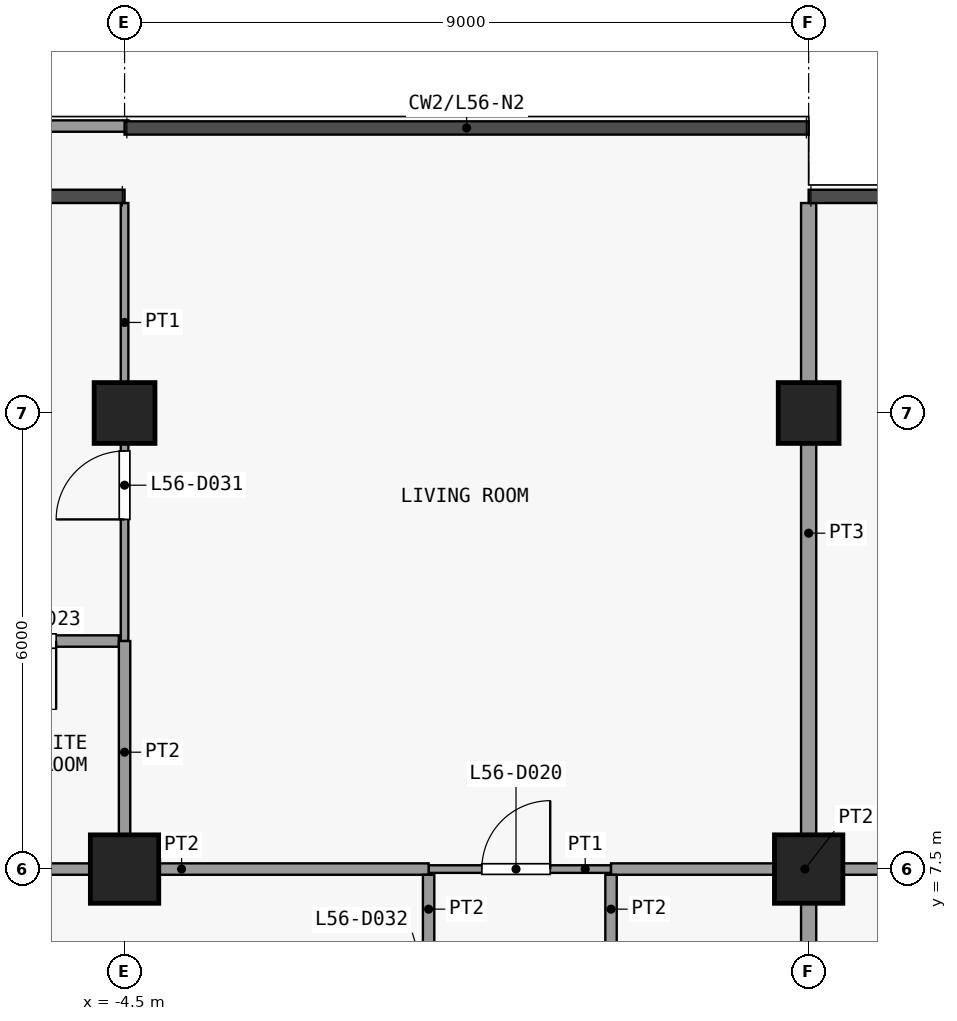
"""IFC4 building model, lengths in metres.
Left out: names, types, materials, properties, quantities, classifications, styles, units other than length and angle.
Written with IfcOpenShell. Run it as: python <this file> out.ifc"""

import sys

from ifc_helpers import new_model, si_unit, direction, frame, frame_2d, origin, origin_2d, place, context, subcontext, project, spatial, rectangle, extrude, element, fill, save


model = new_model("IFC4")
c1 = context("Model", 3, precision=1e-05, world=origin(), true_north=direction((0.0, 1.0)))
c2 = subcontext(c1, "Body", "Model", "MODEL_VIEW")
j1 = project(units=[si_unit("LENGTHUNIT", "METRE"), si_unit("PLANEANGLEUNIT", "RADIAN")], contexts=[c1])
p1 = place(None, origin())
s1 = spatial("IfcSite", under=j1, at=p1, CompositionType="ELEMENT")
p2 = place(p1, origin())
s2 = spatial("IfcBuilding", under=s1, at=p2, CompositionType="ELEMENT")
p3 = place(p2, frame((0.0, 0.0, 223.1)))
s3 = spatial("IfcBuildingStorey", under=s2, at=p3, CompositionType="ELEMENT", Elevation=223.1)
p4 = place(p3, frame((-4.5, 7.5, 0.0), z_axis=(0.0, 0.0, 1.0), x_axis=(1.0, 0.0, 0.0)))
e1 = element("IfcColumn", 1, at=p4, inside=s3, PredefinedType="COLUMN", context=c2, shape_type="SweptSolid", body=[
    extrude(rectangle(XDim=0.9, YDim=0.9, at=origin_2d()), origin(), (0.0, 0.0, 1.0), 3.6),
])
p5 = place(p3, frame((-4.5, 13.5, 0.0), z_axis=(0.0, 0.0, 1.0), x_axis=(1.0, 0.0, 0.0)))
e2 = element("IfcColumn", 2, at=p5, inside=s3, PredefinedType="COLUMN", context=c2, shape_type="SweptSolid", body=[
    extrude(rectangle(XDim=0.8, YDim=0.8, at=origin_2d()), origin(), (0.0, 0.0, 1.0), 3.6),
])
p6 = place(p3, frame((4.5, 7.5, 0.0), z_axis=(0.0, 0.0, 1.0), x_axis=(1.0, 0.0, 0.0)))
e3 = element("IfcColumn", 3, at=p6, inside=s3, PredefinedType="COLUMN", context=c2, shape_type="SweptSolid", body=[
    extrude(rectangle(XDim=0.9, YDim=0.9, at=origin_2d()), origin(), (0.0, 0.0, 1.0), 3.6),
])
p7 = place(p3, frame((4.5, 13.5, 0.0), z_axis=(0.0, 0.0, 1.0), x_axis=(1.0, 0.0, 0.0)))
e4 = element("IfcColumn", 4, at=p7, inside=s3, PredefinedType="COLUMN", context=c2, shape_type="SweptSolid", body=[
    extrude(rectangle(XDim=0.8, YDim=0.8, at=origin_2d()), origin(), (0.0, 0.0, 1.0), 3.6),
])
p8 = place(p3, frame((-10.3, 17.275, 0.0), z_axis=(0.0, 0.0, 1.0), x_axis=(1.0, 0.0, 0.0)))
e5 = element("IfcWall", 5, at=p8, inside=s3, PredefinedType="PARAPET", context=c2, shape_type="SweptSolid", body=[
    extrude(rectangle(XDim=5.853, YDim=0.15, at=frame_2d((2.926, 0.0))), origin(), (0.0, 0.0, 1.0), 1.15),
])
p9 = place(p3, frame((-0.5, 7.5, 0.0), z_axis=(0.0, 0.0, 1.0), x_axis=(1.0, 0.0, 0.0)))
e6 = element("IfcWall", 6, at=p9, inside=s3, PredefinedType="PARTITIONING", context=c2, shape_type="SweptSolid", body=[
    extrude(rectangle(XDim=2.4, YDim=0.1, at=frame_2d((1.2, 0.0))), origin(), (0.0, 0.0, 1.0), 3.3),
])
p10 = place(p9, frame((0.7, 0.0, 0.0)))
e7 = element("IfcOpeningElement", 7, at=p10, cuts=e6, PredefinedType="OPENING", context=c2, shape_type="SweptSolid", body=[
    extrude(rectangle(XDim=0.9, YDim=2.1, at=frame_2d((0.45, 1.05))), frame((0.0, 0.06, 0.0), z_axis=(0.0, -1.0, 0.0), x_axis=(1.0, 0.0, 0.0)), (0.0, 0.0, 1.0), 0.12),
])
p11 = place(p3, frame((-7.0, 7.5, 0.0), z_axis=(0.0, 0.0, 1.0), x_axis=(1.0, 0.0, 0.0)))
e8 = element("IfcWall", 8, at=p11, inside=s3, PredefinedType="PARTITIONING", context=c2, shape_type="SweptSolid", body=[
    extrude(rectangle(XDim=6.5, YDim=0.15, at=frame_2d((3.25, 0.0))), origin(), (0.0, 0.0, 1.0), 3.3),
])
p12 = place(p3, frame((1.9, 7.5, 0.0), z_axis=(0.0, 0.0, 1.0), x_axis=(1.0, 0.0, 0.0)))
e9 = element("IfcWall", 9, at=p12, inside=s3, PredefinedType="PARTITIONING", context=c2, shape_type="SweptSolid", body=[
    extrude(rectangle(XDim=5.1, YDim=0.15, at=frame_2d((2.55, 0.0))), origin(), (0.0, 0.0, 1.0), 3.3),
])
p13 = place(p3, frame((-7.2, 10.5, 0.0), z_axis=(0.0, 0.0, 1.0), x_axis=(1.0, 0.0, 0.0)))
e10 = element("IfcWall", 10, at=p13, inside=s3, PredefinedType="PARTITIONING", context=c2, shape_type="SweptSolid", body=[
    extrude(rectangle(XDim=2.625, YDim=0.15, at=frame_2d((1.312, 0.0))), origin(), (0.0, 0.0, 1.0), 3.3),
])
p14 = place(p13, frame((0.9, 0.0, 0.0)))
e11 = element("IfcOpeningElement", 11, at=p14, cuts=e10, PredefinedType="OPENING", context=c2, shape_type="SweptSolid", body=[
    extrude(rectangle(XDim=0.9, YDim=2.1, at=frame_2d((0.45, 1.05))), frame((0.0, 0.085, 0.0), z_axis=(0.0, -1.0, 0.0), x_axis=(1.0, 0.0, 0.0)), (0.0, 0.0, 1.0), 0.17),
])
p15 = place(p3, frame((-4.5, 10.5, 0.0), z_axis=(0.0, 0.0, 1.0), x_axis=(0.0, 1.0, 0.0)))
e12 = element("IfcWall", 12, at=p15, inside=s3, PredefinedType="PARTITIONING", context=c2, shape_type="SweptSolid", body=[
    extrude(rectangle(XDim=5.762, YDim=0.1, at=frame_2d((2.881, 0.0))), origin(), (0.0, 0.0, 1.0), 3.3),
])
p16 = place(p15, frame((1.6, 0.0, 0.0)))
e13 = element("IfcOpeningElement", 13, at=p16, cuts=e12, PredefinedType="OPENING", context=c2, shape_type="SweptSolid", body=[
    extrude(rectangle(XDim=0.9, YDim=2.1, at=frame_2d((0.45, 1.05))), frame((0.0, 0.06, 0.0), z_axis=(0.0, -1.0, 0.0), x_axis=(1.0, 0.0, 0.0)), (0.0, 0.0, 1.0), 0.12),
])
p17 = place(p3, frame((-4.5, 7.575, 0.0), z_axis=(0.0, 0.0, 1.0), x_axis=(0.0, 1.0, 0.0)))
e14 = element("IfcWall", 14, at=p17, inside=s3, PredefinedType="PARTITIONING", context=c2, shape_type="SweptSolid", body=[
    extrude(rectangle(XDim=2.925, YDim=0.15, at=frame_2d((1.462, 0.0))), origin(), (0.0, 0.0, 1.0), 3.3),
])
p18 = place(p3, frame((-0.5, 4.6, 0.0), z_axis=(0.0, 0.0, 1.0), x_axis=(0.0, 1.0, 0.0)))
e15 = element("IfcWall", 15, at=p18, inside=s3, PredefinedType="PARTITIONING", context=c2, shape_type="SweptSolid", body=[
    extrude(rectangle(XDim=2.825, YDim=0.15, at=frame_2d((1.413, 0.0))), origin(), (0.0, 0.0, 1.0), 3.3),
])
p19 = place(p18, frame((0.9, 0.0, 0.0)))
e16 = element("IfcOpeningElement", 16, at=p19, cuts=e15, PredefinedType="OPENING", context=c2, shape_type="SweptSolid", body=[
    extrude(rectangle(XDim=0.9, YDim=2.1, at=frame_2d((0.45, 1.05))), frame((0.0, 0.085, 0.0), z_axis=(0.0, -1.0, 0.0), x_axis=(1.0, 0.0, 0.0)), (0.0, 0.0, 1.0), 0.17),
])
p20 = place(p3, frame((1.9, 4.6, 0.0), z_axis=(0.0, 0.0, 1.0), x_axis=(0.0, 1.0, 0.0)))
e17 = element("IfcWall", 17, at=p20, inside=s3, PredefinedType="PARTITIONING", context=c2, shape_type="SweptSolid", body=[
    extrude(rectangle(XDim=2.825, YDim=0.15, at=frame_2d((1.413, 0.0))), origin(), (0.0, 0.0, 1.0), 3.3),
])
p21 = place(p20, frame((0.9, 0.0, 0.0)))
e18 = element("IfcOpeningElement", 18, at=p21, cuts=e17, PredefinedType="OPENING", context=c2, shape_type="SweptSolid", body=[
    extrude(rectangle(XDim=0.9, YDim=2.1, at=frame_2d((0.45, 1.05))), frame((0.0, 0.085, 0.0), z_axis=(0.0, -1.0, 0.0), x_axis=(1.0, 0.0, 0.0)), (0.0, 0.0, 1.0), 0.17),
])
p22 = place(p3, frame((4.5, 4.6, 0.0), z_axis=(0.0, 0.0, 1.0), x_axis=(0.0, 1.0, 0.0)))
e19 = element("IfcWall", 19, at=p22, inside=s3, PredefinedType="PARTITIONING", context=c2, shape_type="SweptSolid", body=[
    extrude(rectangle(XDim=2.825, YDim=0.2, at=frame_2d((1.413, 0.0))), origin(), (0.0, 0.0, 1.0), 3.3),
])
p23 = place(p3, frame((4.5, 7.575, 0.0), z_axis=(0.0, 0.0, 1.0), x_axis=(0.0, 1.0, 0.0)))
e20 = element("IfcWall", 20, at=p23, inside=s3, PredefinedType="PARTITIONING", context=c2, shape_type="SweptSolid", body=[
    extrude(rectangle(XDim=8.688, YDim=0.2, at=frame_2d((4.344, 0.0))), origin(), (0.0, 0.0, 1.0), 3.3),
])
p24 = place(p10, origin())
e21 = element("IfcDoor", 21, at=p24, inside=s3, OperationType="SINGLE_SWING_LEFT", PredefinedType="DOOR", context=c2, shape_type="SweptSolid", body=[
    extrude(rectangle(XDim=0.9, YDim=2.1, at=frame_2d((0.45, 1.05))), frame((0.0, 0.025, 0.0), z_axis=(0.0, -1.0, 0.0), x_axis=(1.0, 0.0, 0.0)), (0.0, 0.0, 1.0), 0.05),
])
fill(e7, e21)
p25 = place(p14, origin())
e22 = element("IfcDoor", 22, at=p25, inside=s3, OperationType="SINGLE_SWING_RIGHT", PredefinedType="DOOR", context=c2, shape_type="SweptSolid", body=[
    extrude(rectangle(XDim=0.9, YDim=2.1, at=frame_2d((0.45, 1.05))), frame((0.0, 0.025, 0.0), z_axis=(0.0, -1.0, 0.0), x_axis=(1.0, 0.0, 0.0)), (0.0, 0.0, 1.0), 0.05),
])
fill(e11, e22)
p26 = place(p16, origin())
e23 = element("IfcDoor", 23, at=p26, inside=s3, OperationType="SINGLE_SWING_RIGHT", PredefinedType="DOOR", context=c2, shape_type="SweptSolid", body=[
    extrude(rectangle(XDim=0.9, YDim=2.1, at=frame_2d((0.45, 1.05))), frame((0.0, 0.025, 0.0), z_axis=(0.0, -1.0, 0.0), x_axis=(1.0, 0.0, 0.0)), (0.0, 0.0, 1.0), 0.05),
])
fill(e13, e23)
save(model, sys.argv[1])
